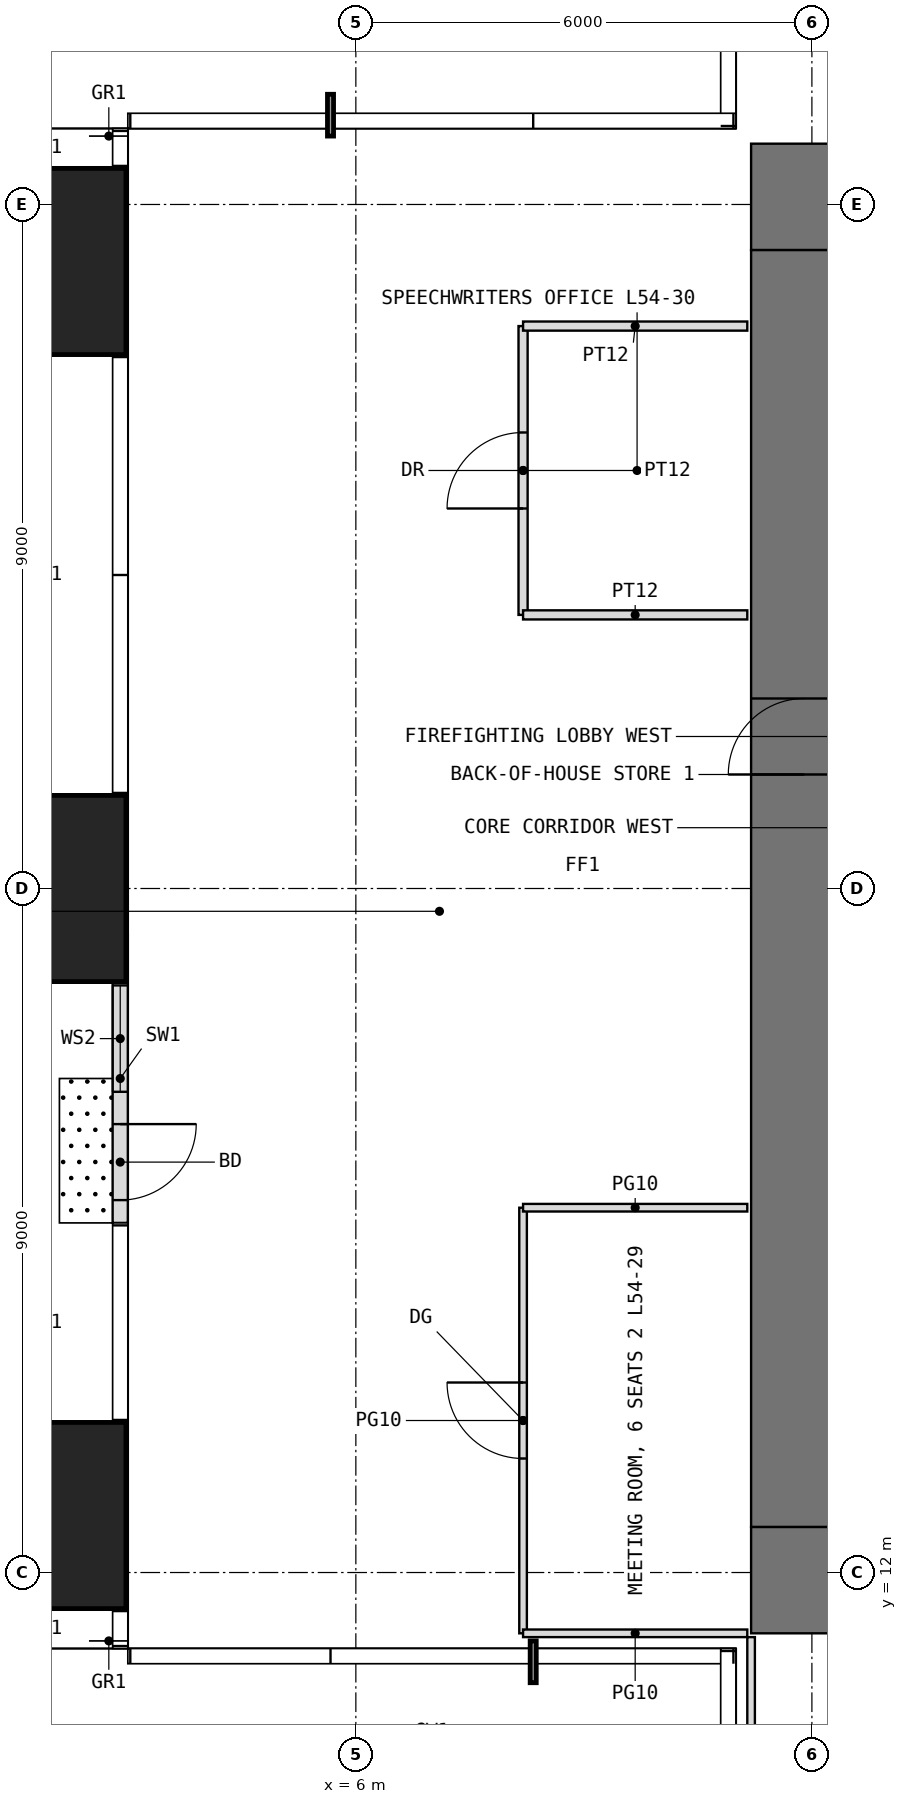
"""IFC4 building model, lengths in metres.
Left out: names, types, materials, properties, quantities, classifications, styles, units other than length and angle.
Written with IfcOpenShell. Run it as: python <this file> out.ifc"""

import sys

from ifc_helpers import new_model, si_unit, direction, frame, frame_2d, origin, origin_2d, place, context, subcontext, project, spatial, rectangle, extrude, element, fill, save


model = new_model("IFC4")
c1 = context("Model", 3, precision=1e-05, world=origin(), true_north=direction((0.0, 1.0)))
c2 = subcontext(c1, "Body", "Model", "MODEL_VIEW")
j1 = project(units=[si_unit("LENGTHUNIT", "METRE"), si_unit("PLANEANGLEUNIT", "RADIAN")], contexts=[c1])
p1 = place(None, origin())
s1 = spatial("IfcSite", under=j1, at=p1, CompositionType="ELEMENT")
p2 = place(p1, origin())
s2 = spatial("IfcBuilding", under=s1, at=p2, CompositionType="ELEMENT")
p3 = place(p2, frame((0.0, 0.0, 226.5)))
s3 = spatial("IfcBuildingStorey", under=s2, at=p3, CompositionType="ELEMENT", Elevation=226.5)
for number, where, z_axis, x_axis in (
    (1, (1.75, 12.75, 0.0), (0.0, 0.0, 1.0), (1.0, 0.0, 0.0)),
    (2, (1.75, 21.0, 0.0), (0.0, 0.0, 1.0), (1.0, 0.0, 0.0)),
    (3, (1.75, 29.25, 0.0), (0.0, 0.0, 1.0), (1.0, 0.0, 0.0)),
):
    element("IfcColumn", number, at=place(p3, frame(where, z_axis=z_axis, x_axis=x_axis)), inside=s3, PredefinedType="COLUMN", context=c2, shape_type="SweptSolid", body=[
        extrude(rectangle(XDim=2.45, YDim=2.45, at=origin_2d()), origin(), (0.0, 0.0, 1.0), 4.0),
    ])
p4 = place(p3, frame((2.9, 20.4, 0.0), z_axis=(0.0, 0.0, 1.0), x_axis=(0.0, -1.0, 0.0)))
e4 = element("IfcWall", 4, at=p4, inside=s3, PredefinedType="USERDEFINED", context=c2, shape_type="SweptSolid", body=[
    extrude(rectangle(XDim=3.8, YDim=0.2, at=frame_2d((1.9, 0.0))), origin(), (0.0, 0.0, 1.0), 3.75),
])
p5 = place(p4, frame((2.5, 0.0, 0.0)))
e5 = element("IfcOpeningElement", 5, at=p5, cuts=e4, PredefinedType="OPENING", context=c2, shape_type="SweptSolid", body=[
    extrude(rectangle(XDim=1.0, YDim=2.4, at=frame_2d((0.5, 1.2))), frame((0.0, 0.11, 0.0), z_axis=(0.0, -1.0, 0.0), x_axis=(1.0, 0.0, 0.0)), (0.0, 0.0, 1.0), 0.22),
])
p6 = place(p4, frame((0.675, 0.0, 0.3)))
e6 = element("IfcOpeningElement", 6, at=p6, cuts=e4, PredefinedType="OPENING", context=c2, shape_type="SweptSolid", body=[
    extrude(rectangle(XDim=1.4, YDim=2.7, at=frame_2d((0.7, 1.35))), frame((0.0, 0.11, 0.0), z_axis=(0.0, -1.0, 0.0), x_axis=(1.0, 0.0, 0.0)), (0.0, 0.0, 1.0), 0.22),
])
p7 = place(p3, frame((11.2, 11.9, -0.05), z_axis=(0.0, 0.0, 1.0), x_axis=(1.0, 0.0, 0.0)))
e7 = element("IfcWall", 7, at=p7, inside=s3, PredefinedType="SHEAR", context=c2, shape_type="SweptSolid", body=[
    extrude(rectangle(XDim=19.6, YDim=1.4, at=frame_2d((9.8, 0.0))), origin(), (0.0, 0.0, 1.0), 4.0),
])
p8 = place(p7, frame((8.8, 0.0, 0.05)))
e8 = element("IfcOpeningElement", 8, at=p8, cuts=e7, PredefinedType="OPENING", context=c2, shape_type="SweptSolid", body=[
    extrude(rectangle(XDim=2.0, YDim=2.2, at=frame_2d((1.0, 1.1))), frame((0.0, 0.71, 0.0), z_axis=(0.0, -1.0, 0.0), x_axis=(1.0, 0.0, 0.0)), (0.0, 0.0, 1.0), 1.42),
])
p9 = place(p3, frame((11.2, 30.1, -0.05), z_axis=(0.0, 0.0, 1.0), x_axis=(1.0, 0.0, 0.0)))
e9 = element("IfcWall", 9, at=p9, inside=s3, PredefinedType="SHEAR", context=c2, shape_type="SweptSolid", body=[
    extrude(rectangle(XDim=19.6, YDim=1.4, at=frame_2d((9.8, 0.0))), origin(), (0.0, 0.0, 1.0), 4.0),
])
p10 = place(p9, frame((8.8, 0.0, 0.05)))
e10 = element("IfcOpeningElement", 10, at=p10, cuts=e9, PredefinedType="OPENING", context=c2, shape_type="SweptSolid", body=[
    extrude(rectangle(XDim=2.0, YDim=2.2, at=frame_2d((1.0, 1.1))), frame((0.0, 0.71, 0.0), z_axis=(0.0, -1.0, 0.0), x_axis=(1.0, 0.0, 0.0)), (0.0, 0.0, 1.0), 1.42),
])
p11 = place(p3, frame((11.9, 12.6, -0.05), z_axis=(0.0, 0.0, 1.0), x_axis=(0.0, 1.0, 0.0)))
e11 = element("IfcWall", 11, at=p11, inside=s3, PredefinedType="SHEAR", context=c2, shape_type="SweptSolid", body=[
    extrude(rectangle(XDim=16.8, YDim=1.4, at=frame_2d((8.4, 0.0))), origin(), (0.0, 0.0, 1.0), 4.0),
])
p12 = place(p11, frame((9.9, 0.0, 0.05)))
e12 = element("IfcOpeningElement", 12, at=p12, cuts=e11, PredefinedType="OPENING", context=c2, shape_type="SweptSolid", body=[
    extrude(rectangle(XDim=1.0, YDim=2.2, at=frame_2d((0.5, 1.1))), frame((0.0, 0.71, 0.0), z_axis=(0.0, -1.0, 0.0), x_axis=(1.0, 0.0, 0.0)), (0.0, 0.0, 1.0), 1.42),
])
p13 = place(p3, frame((8.2, 11.2, 0.0), z_axis=(0.0, 0.0, 1.0), x_axis=(0.0, 1.0, 0.0)))
e13 = element("IfcWall", 13, at=p13, inside=s3, PredefinedType="PARTITIONING", context=c2, shape_type="SweptSolid", body=[
    extrude(rectangle(XDim=5.6, YDim=0.1, at=frame_2d((2.8, 0.0))), origin(), (0.0, 0.0, 1.0), 3.75),
])
p14 = place(p13, frame((2.3, 0.0, 0.0)))
e14 = element("IfcOpeningElement", 14, at=p14, cuts=e13, PredefinedType="OPENING", context=c2, shape_type="SweptSolid", body=[
    extrude(rectangle(XDim=1.0, YDim=2.4, at=frame_2d((0.5, 1.2))), frame((0.0, 0.06, 0.0), z_axis=(0.0, -1.0, 0.0), x_axis=(1.0, 0.0, 0.0)), (0.0, 0.0, 1.0), 0.12),
])
for number, where, z_axis, x_axis in (
    (15, (8.2, 11.2, 0.0), (0.0, 0.0, 1.0), (1.0, 0.0, 0.0)),
    (16, (8.2, 16.8, 0.0), (0.0, 0.0, 1.0), (1.0, 0.0, 0.0)),
):
    element("IfcWall", number, at=place(p3, frame(where, z_axis=z_axis, x_axis=x_axis)), inside=s3, PredefinedType="PARTITIONING", context=c2, shape_type="SweptSolid", body=[
        extrude(rectangle(XDim=2.95, YDim=0.1, at=frame_2d((1.475, 0.0))), origin(), (0.0, 0.0, 1.0), 3.75),
    ])
p15 = place(p3, frame((8.2, 24.6, 0.0), z_axis=(0.0, 0.0, 1.0), x_axis=(0.0, 1.0, 0.0)))
e17 = element("IfcWall", 17, at=p15, inside=s3, PredefinedType="PARTITIONING", context=c2, shape_type="SweptSolid", body=[
    extrude(rectangle(XDim=3.8, YDim=0.12, at=frame_2d((1.9, 0.0))), origin(), (0.0, 0.0, 1.0), 3.75),
])
p16 = place(p15, frame((1.4, 0.0, 0.0)))
e18 = element("IfcOpeningElement", 18, at=p16, cuts=e17, PredefinedType="OPENING", context=c2, shape_type="SweptSolid", body=[
    extrude(rectangle(XDim=1.0, YDim=2.2, at=frame_2d((0.5, 1.1))), frame((0.0, 0.07, 0.0), z_axis=(0.0, -1.0, 0.0), x_axis=(1.0, 0.0, 0.0)), (0.0, 0.0, 1.0), 0.14),
])
for number, where, z_axis, x_axis in (
    (19, (8.2, 24.6, 0.0), (0.0, 0.0, 1.0), (1.0, 0.0, 0.0)),
    (20, (8.2, 28.4, 0.0), (0.0, 0.0, 1.0), (1.0, 0.0, 0.0)),
):
    element("IfcWall", number, at=place(p3, frame(where, z_axis=z_axis, x_axis=x_axis)), inside=s3, PredefinedType="PARTITIONING", context=c2, shape_type="SweptSolid", body=[
        extrude(rectangle(XDim=2.95, YDim=0.12, at=frame_2d((1.475, 0.0))), origin(), (0.0, 0.0, 1.0), 3.75),
    ])
p17 = place(p3, frame((11.2, 6.6, 0.0), z_axis=(0.0, 0.0, 1.0), x_axis=(0.0, 1.0, 0.0)))
e21 = element("IfcWall", 21, at=p17, inside=s3, PredefinedType="PARTITIONING", context=c2, shape_type="SweptSolid", body=[
    extrude(rectangle(XDim=4.55, YDim=0.1, at=frame_2d((2.275, 0.0))), origin(), (0.0, 0.0, 1.0), 3.75),
])
p18 = place(p5, origin())
e22 = element("IfcDoor", 22, at=p18, inside=s3, OperationType="SINGLE_SWING_LEFT", PredefinedType="DOOR", context=c2, shape_type="SweptSolid", body=[
    extrude(rectangle(XDim=1.0, YDim=2.4, at=frame_2d((0.5, 1.2))), frame((0.0, 0.025, 0.0), z_axis=(0.0, -1.0, 0.0), x_axis=(1.0, 0.0, 0.0)), (0.0, 0.0, 1.0), 0.05),
])
fill(e5, e22)
p19 = place(p6, origin())
e23 = element("IfcWindow", 23, at=p19, inside=s3, PartitioningType="SINGLE_PANEL", PredefinedType="WINDOW", context=c2, shape_type="SweptSolid", body=[
    extrude(rectangle(XDim=1.4, YDim=2.7, at=frame_2d((0.7, 1.35))), frame((0.0, 0.03, 0.0), z_axis=(0.0, -1.0, 0.0), x_axis=(1.0, 0.0, 0.0)), (0.0, 0.0, 1.0), 0.06),
])
fill(e6, e23)
p20 = place(p12, origin())
e24 = element("IfcDoor", 24, at=p20, inside=s3, OperationType="SINGLE_SWING_LEFT", PredefinedType="DOOR", context=c2, shape_type="SweptSolid", body=[
    extrude(rectangle(XDim=1.0, YDim=2.2, at=frame_2d((0.5, 1.1))), frame((0.0, 0.025, 0.0), z_axis=(0.0, -1.0, 0.0), x_axis=(1.0, 0.0, 0.0)), (0.0, 0.0, 1.0), 0.05),
])
fill(e12, e24)
p21 = place(p14, origin())
e25 = element("IfcDoor", 25, at=p21, inside=s3, OperationType="SINGLE_SWING_RIGHT", PredefinedType="DOOR", context=c2, shape_type="SweptSolid", body=[
    extrude(rectangle(XDim=1.0, YDim=2.4, at=frame_2d((0.5, 1.2))), frame((0.0, 0.025, 0.0), z_axis=(0.0, -1.0, 0.0), x_axis=(1.0, 0.0, 0.0)), (0.0, 0.0, 1.0), 0.05),
])
fill(e14, e25)
p22 = place(p16, origin())
e26 = element("IfcDoor", 26, at=p22, inside=s3, OperationType="SINGLE_SWING_LEFT", PredefinedType="DOOR", context=c2, shape_type="SweptSolid", body=[
    extrude(rectangle(XDim=1.0, YDim=2.2, at=frame_2d((0.5, 1.1))), frame((0.0, 0.025, 0.0), z_axis=(0.0, -1.0, 0.0), x_axis=(1.0, 0.0, 0.0)), (0.0, 0.0, 1.0), 0.05),
])
fill(e18, e26)
save(model, sys.argv[1])
